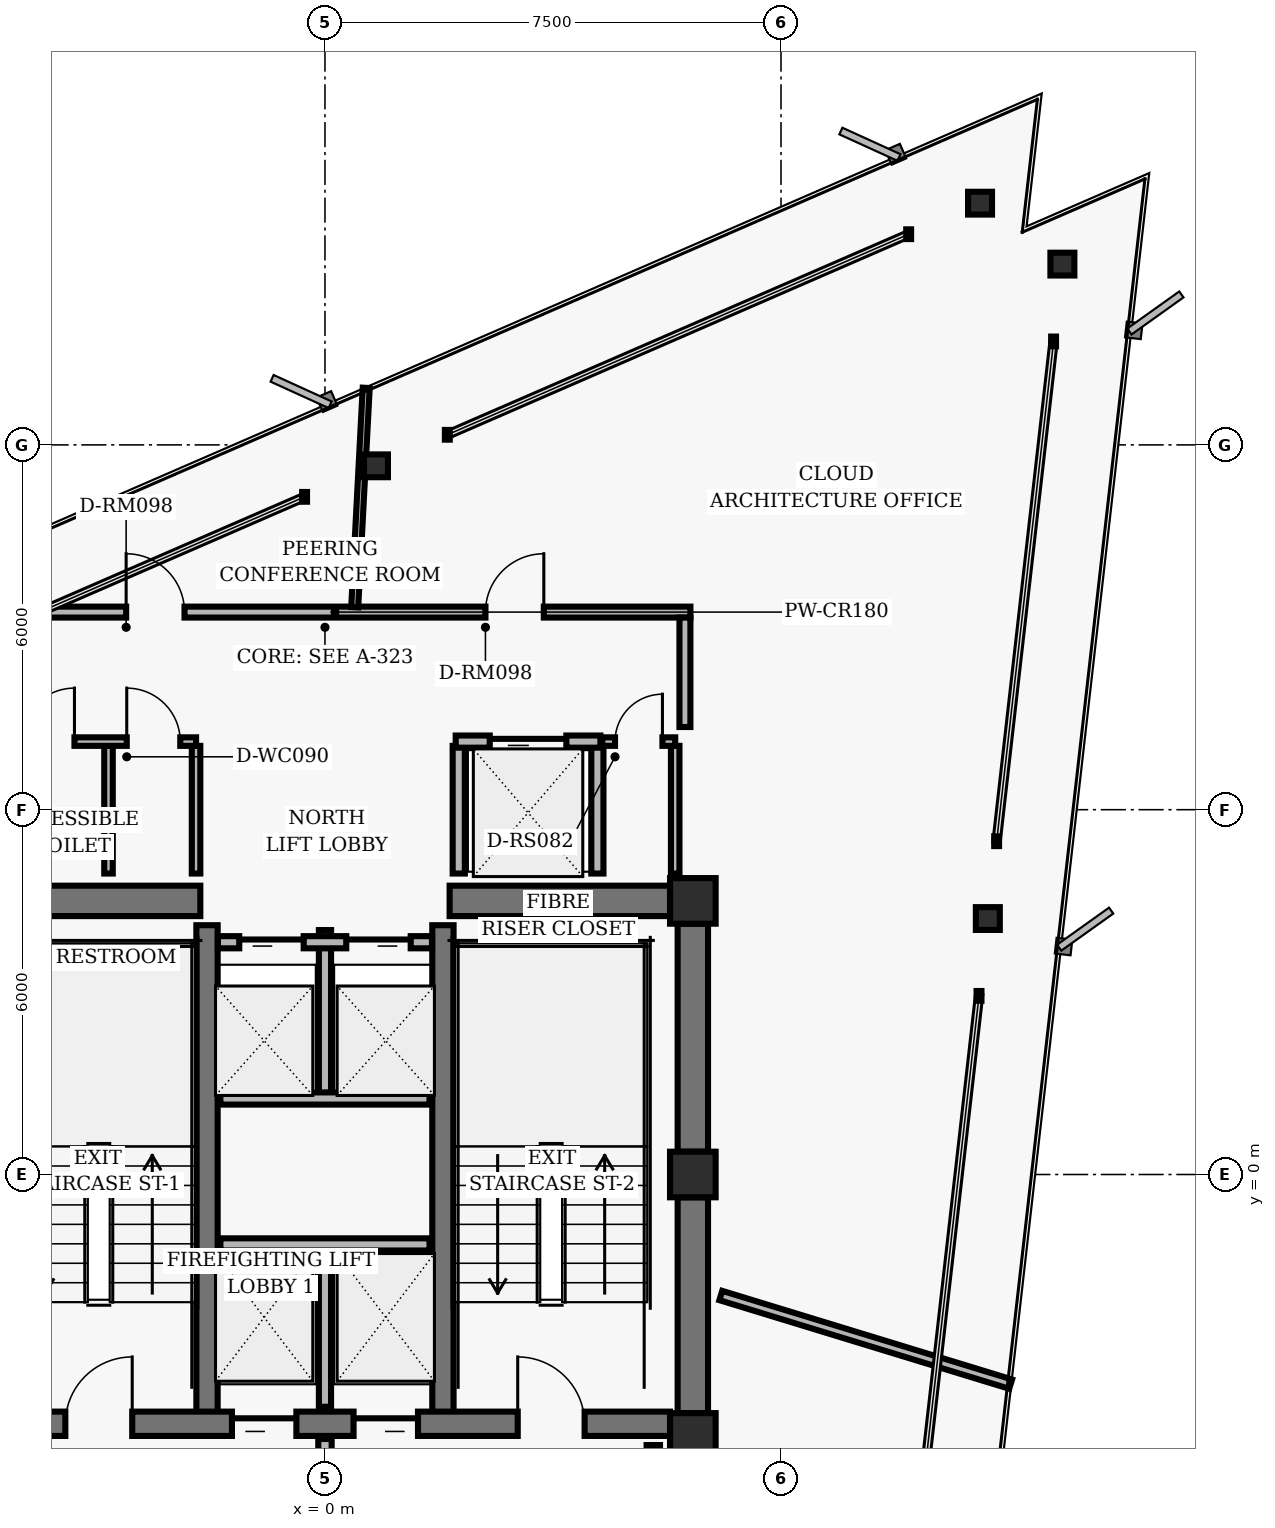
"""IFC4 building model, lengths in metres.
Left out: names, types, materials, properties, quantities, classifications, styles, units other than length and angle.
Written with IfcOpenShell. Run it as: python <this file> out.ifc"""

import sys

from ifc_helpers import new_model, si_unit, direction, frame, frame_2d, origin, origin_2d, place, context, subcontext, project, spatial, rectangle, hollow_rectangle, i_section, extrude, element, fill, save


model = new_model("IFC4")
c1 = context("Model", 3, precision=1e-05, world=origin(), true_north=direction((0.0, 1.0)))
c2 = subcontext(c1, "Body", "Model", "MODEL_VIEW")
j1 = project(units=[si_unit("LENGTHUNIT", "METRE"), si_unit("PLANEANGLEUNIT", "RADIAN")], contexts=[c1])
p1 = place(None, origin())
s1 = spatial("IfcSite", under=j1, at=p1, CompositionType="ELEMENT")
p2 = place(p1, origin())
s2 = spatial("IfcBuilding", under=s1, at=p2, CompositionType="ELEMENT")
p3 = place(p2, frame((0.0, 0.0, 224.0)))
s3 = spatial("IfcBuildingStorey", under=s2, at=p3, CompositionType="ELEMENT", Elevation=224.0)
for number, where, z_axis, x_axis in (
    (1, (6.05, 4.5, 0.0), (0.0, 0.0, 1.0), (1.0, 0.0, 0.0)),
    (2, (6.05, 0.0, 0.0), (0.0, 0.0, 1.0), (1.0, 0.0, 0.0)),
    (3, (6.05, -4.3, 0.0), (0.0, 0.0, 1.0), (1.0, 0.0, 0.0)),
):
    element("IfcColumn", number, at=place(p3, frame(where, z_axis=z_axis, x_axis=x_axis)), inside=s3, PredefinedType="COLUMN", context=c2, shape_type="SweptSolid", body=[
        extrude(hollow_rectangle(XDim=0.75, YDim=0.75, WallThickness=0.05, InnerFilletRadius=0.02, OuterFilletRadius=0.04, at=origin_2d()), origin(), (0.0, 0.0, 1.0), 3.04),
    ])
p4 = place(p3, frame((6.05, 0.375, 0.0), z_axis=(0.0, 0.0, 1.0), x_axis=(0.0, 1.0, 0.0)))
e4 = element("IfcWall", 4, at=p4, inside=s3, PredefinedType="SHEAR", context=c2, shape_type="SweptSolid", body=[
    extrude(rectangle(XDim=3.75, YDim=0.5, at=frame_2d((1.875, 0.0))), origin(), (0.0, 0.0, 1.0), 2.798),
])
p5 = place(p3, frame((6.05, -3.925, 0.0), z_axis=(0.0, 0.0, 1.0), x_axis=(0.0, 1.0, 0.0)))
e5 = element("IfcWall", 5, at=p5, inside=s3, PredefinedType="SHEAR", context=c2, shape_type="SweptSolid", body=[
    extrude(rectangle(XDim=3.55, YDim=0.5, at=frame_2d((1.775, 0.0))), origin(), (0.0, 0.0, 1.0), 2.798),
])
for number, where, z_axis, x_axis in (
    (6, (-1.94, -4.1, 0.0), (0.0, 0.0, 1.0), (0.0, 1.0, 0.0)),
    (7, (1.94, -4.1, 0.0), (0.0, 0.0, 1.0), (0.0, 1.0, 0.0)),
):
    element("IfcWall", number, at=place(p3, frame(where, z_axis=z_axis, x_axis=x_axis)), inside=s3, PredefinedType="SHEAR", context=c2, shape_type="SweptSolid", body=[
        extrude(rectangle(XDim=8.2, YDim=0.35, at=frame_2d((4.1, 0.0))), origin(), (0.0, 0.0, 1.0), 2.798),
    ])
p6 = place(p3, frame((-5.675, -4.1, 0.0), z_axis=(0.0, 0.0, 1.0), x_axis=(1.0, 0.0, 0.0)))
e8 = element("IfcWall", 8, at=p6, inside=s3, PredefinedType="SHEAR", context=c2, shape_type="SweptSolid", body=[
    extrude(rectangle(XDim=11.35, YDim=0.4, at=frame_2d((5.675, 0.0))), origin(), (0.0, 0.0, 1.0), 2.798),
])
p7 = place(p6, frame((1.405, 0.0, 0.0)))
e9 = element("IfcOpeningElement", 9, at=p7, cuts=e8, PredefinedType="OPENING", context=c2, shape_type="SweptSolid", body=[
    extrude(rectangle(XDim=1.1, YDim=2.04, at=frame_2d((0.55, 1.02))), frame((0.0, 0.21, 0.0), z_axis=(0.0, -1.0, 0.0), x_axis=(1.0, 0.0, 0.0)), (0.0, 0.0, 1.0), 0.42),
])
p8 = place(p6, frame((8.845, 0.0, 0.0)))
e10 = element("IfcOpeningElement", 10, at=p8, cuts=e8, PredefinedType="OPENING", context=c2, shape_type="SweptSolid", body=[
    extrude(rectangle(XDim=1.1, YDim=2.04, at=frame_2d((0.55, 1.02))), frame((0.0, 0.21, 0.0), z_axis=(0.0, -1.0, 0.0), x_axis=(1.0, 0.0, 0.0)), (0.0, 0.0, 1.0), 0.42),
])
p9 = place(p6, frame((4.145, 0.0, 0.0)))
e11 = element("IfcOpeningElement", 11, at=p9, cuts=e8, PredefinedType="OPENING", context=c2, shape_type="SweptSolid", body=[
    extrude(rectangle(XDim=1.06, YDim=2.04, at=frame_2d((0.53, 1.02))), frame((0.0, 0.21, 0.0), z_axis=(0.0, -1.0, 0.0), x_axis=(1.0, 0.0, 0.0)), (0.0, 0.0, 1.0), 0.42),
])
p10 = place(p6, frame((6.145, 0.0, 0.0)))
e12 = element("IfcOpeningElement", 12, at=p10, cuts=e8, PredefinedType="OPENING", context=c2, shape_type="SweptSolid", body=[
    extrude(rectangle(XDim=1.06, YDim=2.04, at=frame_2d((0.53, 1.02))), frame((0.0, 0.21, 0.0), z_axis=(0.0, -1.0, 0.0), x_axis=(1.0, 0.0, 0.0)), (0.0, 0.0, 1.0), 0.42),
])
for number, where, z_axis, x_axis in (
    (13, (-5.675, 4.5, 0.0), (0.0, 0.0, 1.0), (1.0, 0.0, 0.0)),
    (14, (2.05, 4.5, 0.0), (0.0, 0.0, 1.0), (1.0, 0.0, 0.0)),
):
    element("IfcWall", number, at=place(p3, frame(where, z_axis=z_axis, x_axis=x_axis)), inside=s3, PredefinedType="SHEAR", context=c2, shape_type="SweptSolid", body=[
        extrude(rectangle(XDim=3.625, YDim=0.5, at=frame_2d((1.812, 0.0))), origin(), (0.0, 0.0, 1.0), 2.798),
    ])
for number, where, z_axis, x_axis in (
    (15, (10.901, 4.21, 0.0), (0.0, 0.0, 1.0), (1.0, 0.0, 0.0)),
    (16, (12.128, 14.973, 0.0), (0.0, 0.0, 1.0), (1.0, 0.0, 0.0)),
    (17, (10.773, 15.976, 0.0), (0.0, 0.0, 1.0), (1.0, 0.0, 0.0)),
    (18, (0.838, 11.656, 0.0), (0.0, 0.0, 1.0), (1.0, 0.0, 0.0)),
):
    element("IfcColumn", number, at=place(p3, frame(where, z_axis=z_axis, x_axis=x_axis)), inside=s3, PredefinedType="COLUMN", context=c2, shape_type="SweptSolid", body=[
        extrude(i_section(OverallWidth=0.394, OverallDepth=0.375, WebThickness=0.017, FlangeThickness=0.028, FilletRadius=0.016, at=origin_2d()), origin(), (0.0, 0.0, 1.0), 3.04),
    ])
p11 = place(p3, frame((0.0, -3.82, 0.0), z_axis=(0.0, 0.0, 1.0), x_axis=(0.0, 1.0, 0.0)))
e19 = element("IfcWall", 19, at=p11, inside=s3, PredefinedType="PARTITIONING", context=c2, shape_type="SweptSolid", body=[
    extrude(rectangle(XDim=2.67, YDim=0.2, at=frame_2d((1.335, 0.0))), origin(), (0.0, 0.0, 1.0), 2.773),
])
p12 = place(p3, frame((-1.72, -1.15, 0.0), z_axis=(0.0, 0.0, 1.0), x_axis=(1.0, 0.0, 0.0)))
e20 = element("IfcWall", 20, at=p12, inside=s3, PredefinedType="PARTITIONING", context=c2, shape_type="SweptSolid", body=[
    extrude(rectangle(XDim=3.44, YDim=0.2, at=frame_2d((1.72, 0.0))), origin(), (0.0, 0.0, 1.0), 2.773),
])
p13 = place(p3, frame((5.4, -7.16, 0.0), z_axis=(0.0, 0.0, 1.0), x_axis=(0.0, 1.0, 0.0)))
e21 = element("IfcWall", 21, at=p13, inside=s3, PredefinedType="PARTITIONING", context=c2, shape_type="SweptSolid", body=[
    extrude(rectangle(XDim=2.71, YDim=0.22, at=frame_2d((1.355, 0.0))), origin(), (0.0, 0.0, 1.0), 2.773),
])
p14 = place(p3, frame((0.0, -7.16, 0.0), z_axis=(0.0, 0.0, 1.0), x_axis=(0.0, 1.0, 0.0)))
e22 = element("IfcWall", 22, at=p14, inside=s3, PredefinedType="PARTITIONING", context=c2, shape_type="SweptSolid", body=[
    extrude(rectangle(XDim=2.81, YDim=0.22, at=frame_2d((1.405, 0.0))), origin(), (0.0, 0.0, 1.0), 2.773),
])
p15 = place(p3, frame((0.0, 1.25, 0.0), z_axis=(0.0, 0.0, 1.0), x_axis=(0.0, 1.0, 0.0)))
e23 = element("IfcWall", 23, at=p15, inside=s3, PredefinedType="PARTITIONING", context=c2, shape_type="SweptSolid", body=[
    extrude(rectangle(XDim=2.77, YDim=0.2, at=frame_2d((1.385, 0.0))), origin(), (0.0, 0.0, 1.0), 2.773),
])
p16 = place(p3, frame((-1.72, 1.25, 0.0), z_axis=(0.0, 0.0, 1.0), x_axis=(1.0, 0.0, 0.0)))
e24 = element("IfcWall", 24, at=p16, inside=s3, PredefinedType="PARTITIONING", context=c2, shape_type="SweptSolid", body=[
    extrude(rectangle(XDim=3.44, YDim=0.2, at=frame_2d((1.72, 0.0))), origin(), (0.0, 0.0, 1.0), 2.773),
])
p17 = place(p3, frame((-1.76, 3.82, 0.0), z_axis=(0.0, 0.0, 1.0), x_axis=(1.0, 0.0, 0.0)))
e25 = element("IfcWall", 25, at=p17, inside=s3, PredefinedType="PARTITIONING", context=c2, shape_type="SweptSolid", body=[
    extrude(rectangle(XDim=3.52, YDim=0.2, at=frame_2d((1.76, 0.0))), origin(), (0.0, 0.0, 1.0), 2.773),
])
p18 = place(p17, frame((0.35, 0.0, 0.0)))
e26 = element("IfcOpeningElement", 26, at=p18, cuts=e25, PredefinedType="OPENING", context=c2, shape_type="SweptSolid", body=[
    extrude(rectangle(XDim=1.06, YDim=2.04, at=frame_2d((0.53, 1.02))), frame((0.0, 0.11, 0.0), z_axis=(0.0, -1.0, 0.0), x_axis=(1.0, 0.0, 0.0)), (0.0, 0.0, 1.0), 0.22),
])
p19 = place(p17, frame((2.11, 0.0, 0.0)))
e27 = element("IfcOpeningElement", 27, at=p19, cuts=e25, PredefinedType="OPENING", context=c2, shape_type="SweptSolid", body=[
    extrude(rectangle(XDim=1.06, YDim=2.04, at=frame_2d((0.53, 1.02))), frame((0.0, 0.11, 0.0), z_axis=(0.0, -1.0, 0.0), x_axis=(1.0, 0.0, 0.0)), (0.0, 0.0, 1.0), 0.22),
])
for number, where, z_axis, x_axis in (
    (28, (2.2, 4.95, 0.0), (0.0, 0.0, 1.0), (0.0, 1.0, 0.0)),
    (29, (4.48, 4.95, 0.0), (0.0, 0.0, 1.0), (0.0, 1.0, 0.0)),
):
    element("IfcWall", number, at=place(p3, frame(where, z_axis=z_axis, x_axis=x_axis)), inside=s3, PredefinedType="PARTITIONING", context=c2, shape_type="SweptSolid", body=[
        extrude(rectangle(XDim=2.1, YDim=0.2, at=frame_2d((1.05, 0.0))), origin(), (0.0, 0.0, 1.0), 2.773),
    ])
p20 = place(p3, frame((2.15, 7.12, 0.0), z_axis=(0.0, 0.0, 1.0), x_axis=(1.0, 0.0, 0.0)))
e30 = element("IfcWall", 30, at=p20, inside=s3, PredefinedType="PARTITIONING", context=c2, shape_type="SweptSolid", body=[
    extrude(rectangle(XDim=2.38, YDim=0.2, at=frame_2d((1.19, 0.0))), origin(), (0.0, 0.0, 1.0), 2.395),
])
p21 = place(p20, frame((0.56, 0.0, 0.0)))
e31 = element("IfcOpeningElement", 31, at=p21, cuts=e30, PredefinedType="OPENING", context=c2, shape_type="SweptSolid", body=[
    extrude(rectangle(XDim=1.26, YDim=2.06, at=frame_2d((0.63, 1.03))), frame((0.0, 0.11, 0.0), z_axis=(0.0, -1.0, 0.0), x_axis=(1.0, 0.0, 0.0)), (0.0, 0.0, 1.0), 0.22),
])
for number, where, z_axis, x_axis in (
    (32, (-3.56, 4.95, 0.0), (0.0, 0.0, 1.0), (0.0, 1.0, 0.0)),
    (33, (-2.12, 4.95, 0.0), (0.0, 0.0, 1.0), (0.0, 1.0, 0.0)),
):
    element("IfcWall", number, at=place(p3, frame(where, z_axis=z_axis, x_axis=x_axis)), inside=s3, PredefinedType="PARTITIONING", context=c2, shape_type="SweptSolid", body=[
        extrude(rectangle(XDim=2.1, YDim=0.14, at=frame_2d((1.05, 0.0))), origin(), (0.0, 0.0, 1.0), 2.773),
    ])
p22 = place(p3, frame((-5.48, 7.12, 0.0), z_axis=(0.0, 0.0, 1.0), x_axis=(1.0, 0.0, 0.0)))
e34 = element("IfcWall", 34, at=p22, inside=s3, PredefinedType="PARTITIONING", context=c2, shape_type="SweptSolid", body=[
    extrude(rectangle(XDim=3.36, YDim=0.14, at=frame_2d((1.68, 0.0))), origin(), (0.0, 0.0, 1.0), 2.395),
])
p23 = place(p22, frame((0.48, 0.0, 0.0)))
e35 = element("IfcOpeningElement", 35, at=p23, cuts=e34, PredefinedType="OPENING", context=c2, shape_type="SweptSolid", body=[
    extrude(rectangle(XDim=0.88, YDim=2.02, at=frame_2d((0.44, 1.01))), frame((0.0, 0.08, 0.0), z_axis=(0.0, -1.0, 0.0), x_axis=(1.0, 0.0, 0.0)), (0.0, 0.0, 1.0), 0.16),
])
p24 = place(p22, frame((2.22, 0.0, 0.0)))
e36 = element("IfcOpeningElement", 36, at=p24, cuts=e34, PredefinedType="OPENING", context=c2, shape_type="SweptSolid", body=[
    extrude(rectangle(XDim=0.88, YDim=2.02, at=frame_2d((0.44, 1.01))), frame((0.0, 0.08, 0.0), z_axis=(0.0, -1.0, 0.0), x_axis=(1.0, 0.0, 0.0)), (0.0, 0.0, 1.0), 0.16),
])
p25 = place(p3, frame((5.76, 4.95, 0.0), z_axis=(0.0, 0.0, 1.0), x_axis=(0.0, 1.0, 0.0)))
e37 = element("IfcWall", 37, at=p25, inside=s3, PredefinedType="PARTITIONING", context=c2, shape_type="SweptSolid", body=[
    extrude(rectangle(XDim=2.1, YDim=0.14, at=frame_2d((1.05, 0.0))), origin(), (0.0, 0.0, 1.0), 2.773),
])
p26 = place(p3, frame((4.56, 7.12, 0.0), z_axis=(0.0, 0.0, 1.0), x_axis=(1.0, 0.0, 0.0)))
e38 = element("IfcWall", 38, at=p26, inside=s3, PredefinedType="PARTITIONING", context=c2, shape_type="SweptSolid", body=[
    extrude(rectangle(XDim=1.2, YDim=0.14, at=frame_2d((0.6, 0.0))), origin(), (0.0, 0.0, 1.0), 2.773),
])
p27 = place(p26, frame((0.21, 0.0, 0.0)))
e39 = element("IfcOpeningElement", 39, at=p27, cuts=e38, PredefinedType="OPENING", context=c2, shape_type="SweptSolid", body=[
    extrude(rectangle(XDim=0.78, YDim=2.01, at=frame_2d((0.39, 1.005))), frame((0.0, 0.08, 0.0), z_axis=(0.0, -1.0, 0.0), x_axis=(1.0, 0.0, 0.0)), (0.0, 0.0, 1.0), 0.16),
])
p28 = place(p3, frame((-7.29, 9.25, 0.0), z_axis=(0.0, 0.0, 1.0), x_axis=(1.0, 0.0, 0.0)))
e40 = element("IfcWall", 40, at=p28, inside=s3, PredefinedType="PARTITIONING", context=c2, shape_type="SweptSolid", body=[
    extrude(rectangle(XDim=13.3, YDim=0.18, at=frame_2d((6.65, 0.0))), origin(), (0.0, 0.0, 1.0), 2.395),
])
p29 = place(p28, frame((9.929, 0.0, 0.0)))
e41 = element("IfcOpeningElement", 41, at=p29, cuts=e40, PredefinedType="OPENING", context=c2, shape_type="SweptSolid", body=[
    extrude(rectangle(XDim=0.96, YDim=2.02, at=frame_2d((0.48, 1.01))), frame((0.0, 0.1, 0.0), z_axis=(0.0, -1.0, 0.0), x_axis=(1.0, 0.0, 0.0)), (0.0, 0.0, 1.0), 0.2),
])
p30 = place(p28, frame((4.02, 0.0, 0.0)))
e42 = element("IfcOpeningElement", 42, at=p30, cuts=e40, PredefinedType="OPENING", context=c2, shape_type="SweptSolid", body=[
    extrude(rectangle(XDim=0.96, YDim=2.02, at=frame_2d((0.48, 1.01))), frame((0.0, 0.1, 0.0), z_axis=(0.0, -1.0, 0.0), x_axis=(1.0, 0.0, 0.0)), (0.0, 0.0, 1.0), 0.2),
])
p31 = place(p3, frame((5.92, 9.16, 0.0), z_axis=(0.0, 0.0, 1.0), x_axis=(0.0, -1.0, 0.0)))
e43 = element("IfcWall", 43, at=p31, inside=s3, PredefinedType="PARTITIONING", context=c2, shape_type="SweptSolid", body=[
    extrude(rectangle(XDim=1.8, YDim=0.18, at=frame_2d((0.9, 0.0))), origin(), (0.0, 0.0, 1.0), 2.773),
])
p32 = place(p3, frame((6.51, -1.99, 0.0), z_axis=(0.0, 0.0, 1.0), x_axis=(0.956296423481, -0.292398957653, 0.0)))
e44 = element("IfcWall", 44, at=p32, inside=s3, PredefinedType="PARTITIONING", context=c2, shape_type="SweptSolid", body=[
    extrude(rectangle(XDim=4.985, YDim=0.16, at=frame_2d((2.492, 0.0))), origin(), (0.0, 0.0, 1.0), 2.773),
])
p33 = place(p3, frame((0.489, 9.33, 0.0), z_axis=(0.0, 0.0, 1.0), x_axis=(0.05229993373, 0.998631421963, 0.0)))
e45 = element("IfcWall", 45, at=p33, inside=s3, PredefinedType="MOVABLE", context=c2, shape_type="SweptSolid", body=[
    extrude(rectangle(XDim=3.613, YDim=0.115, at=frame_2d((1.807, 0.0))), origin(), (0.0, 0.0, 1.0), 2.773),
])
p34 = place(p7, origin())
e46 = element("IfcDoor", 46, at=p34, inside=s3, OperationType="SINGLE_SWING_RIGHT", PredefinedType="DOOR", context=c2, shape_type="SweptSolid", body=[
    extrude(rectangle(XDim=1.1, YDim=2.04, at=frame_2d((0.55, 1.02))), frame((0.0, 0.025, 0.0), z_axis=(0.0, -1.0, 0.0), x_axis=(1.0, 0.0, 0.0)), (0.0, 0.0, 1.0), 0.05),
])
fill(e9, e46)
p35 = place(p8, origin())
e47 = element("IfcDoor", 47, at=p35, inside=s3, OperationType="SINGLE_SWING_LEFT", PredefinedType="DOOR", context=c2, shape_type="SweptSolid", body=[
    extrude(rectangle(XDim=1.1, YDim=2.04, at=frame_2d((0.55, 1.02))), frame((0.0, 0.025, 0.0), z_axis=(0.0, -1.0, 0.0), x_axis=(1.0, 0.0, 0.0)), (0.0, 0.0, 1.0), 0.05),
])
fill(e10, e47)
p36 = place(p9, origin())
e48 = element("IfcDoor", 48, at=p36, inside=s3, OperationType="SLIDING_TO_LEFT", PredefinedType="DOOR", context=c2, shape_type="SweptSolid", body=[
    extrude(rectangle(XDim=1.06, YDim=2.04, at=frame_2d((0.53, 1.02))), frame((0.0, 0.025, 0.0), z_axis=(0.0, -1.0, 0.0), x_axis=(1.0, 0.0, 0.0)), (0.0, 0.0, 1.0), 0.05),
])
fill(e11, e48)
p37 = place(p10, origin())
e49 = element("IfcDoor", 49, at=p37, inside=s3, OperationType="SLIDING_TO_RIGHT", PredefinedType="DOOR", context=c2, shape_type="SweptSolid", body=[
    extrude(rectangle(XDim=1.06, YDim=2.04, at=frame_2d((0.53, 1.02))), frame((0.0, 0.025, 0.0), z_axis=(0.0, -1.0, 0.0), x_axis=(1.0, 0.0, 0.0)), (0.0, 0.0, 1.0), 0.05),
])
fill(e12, e49)
p38 = place(p18, origin())
e50 = element("IfcDoor", 50, at=p38, inside=s3, OperationType="SLIDING_TO_LEFT", PredefinedType="DOOR", context=c2, shape_type="SweptSolid", body=[
    extrude(rectangle(XDim=1.06, YDim=2.04, at=frame_2d((0.53, 1.02))), frame((0.0, 0.025, 0.0), z_axis=(0.0, -1.0, 0.0), x_axis=(1.0, 0.0, 0.0)), (0.0, 0.0, 1.0), 0.05),
])
fill(e26, e50)
p39 = place(p19, origin())
e51 = element("IfcDoor", 51, at=p39, inside=s3, OperationType="SLIDING_TO_RIGHT", PredefinedType="DOOR", context=c2, shape_type="SweptSolid", body=[
    extrude(rectangle(XDim=1.06, YDim=2.04, at=frame_2d((0.53, 1.02))), frame((0.0, 0.025, 0.0), z_axis=(0.0, -1.0, 0.0), x_axis=(1.0, 0.0, 0.0)), (0.0, 0.0, 1.0), 0.05),
])
fill(e27, e51)
p40 = place(p21, origin())
e52 = element("IfcDoor", 52, at=p40, inside=s3, OperationType="SLIDING_TO_LEFT", PredefinedType="DOOR", context=c2, shape_type="SweptSolid", body=[
    extrude(rectangle(XDim=1.26, YDim=2.06, at=frame_2d((0.63, 1.03))), frame((0.0, 0.025, 0.0), z_axis=(0.0, -1.0, 0.0), x_axis=(1.0, 0.0, 0.0)), (0.0, 0.0, 1.0), 0.05),
])
fill(e31, e52)
p41 = place(p23, origin())
e53 = element("IfcDoor", 53, at=p41, inside=s3, OperationType="SINGLE_SWING_RIGHT", PredefinedType="DOOR", context=c2, shape_type="SweptSolid", body=[
    extrude(rectangle(XDim=0.88, YDim=2.02, at=frame_2d((0.44, 1.01))), frame((0.0, 0.025, 0.0), z_axis=(0.0, -1.0, 0.0), x_axis=(1.0, 0.0, 0.0)), (0.0, 0.0, 1.0), 0.05),
])
fill(e35, e53)
p42 = place(p24, origin())
e54 = element("IfcDoor", 54, at=p42, inside=s3, OperationType="SINGLE_SWING_LEFT", PredefinedType="DOOR", context=c2, shape_type="SweptSolid", body=[
    extrude(rectangle(XDim=0.88, YDim=2.02, at=frame_2d((0.44, 1.01))), frame((0.0, 0.025, 0.0), z_axis=(0.0, -1.0, 0.0), x_axis=(1.0, 0.0, 0.0)), (0.0, 0.0, 1.0), 0.05),
])
fill(e36, e54)
p43 = place(p27, origin())
e55 = element("IfcDoor", 55, at=p43, inside=s3, OperationType="SINGLE_SWING_RIGHT", PredefinedType="DOOR", context=c2, shape_type="SweptSolid", body=[
    extrude(rectangle(XDim=0.78, YDim=2.01, at=frame_2d((0.39, 1.005))), frame((0.0, 0.025, 0.0), z_axis=(0.0, -1.0, 0.0), x_axis=(1.0, 0.0, 0.0)), (0.0, 0.0, 1.0), 0.05),
])
fill(e39, e55)
p44 = place(p29, origin())
e56 = element("IfcDoor", 56, at=p44, inside=s3, OperationType="SINGLE_SWING_RIGHT", PredefinedType="DOOR", context=c2, shape_type="SweptSolid", body=[
    extrude(rectangle(XDim=0.96, YDim=2.02, at=frame_2d((0.48, 1.01))), frame((0.0, 0.025, 0.0), z_axis=(0.0, -1.0, 0.0), x_axis=(1.0, 0.0, 0.0)), (0.0, 0.0, 1.0), 0.05),
])
fill(e41, e56)
p45 = place(p30, origin())
e57 = element("IfcDoor", 57, at=p45, inside=s3, OperationType="SINGLE_SWING_LEFT", PredefinedType="DOOR", context=c2, shape_type="SweptSolid", body=[
    extrude(rectangle(XDim=0.96, YDim=2.02, at=frame_2d((0.48, 1.01))), frame((0.0, 0.025, 0.0), z_axis=(0.0, -1.0, 0.0), x_axis=(1.0, 0.0, 0.0)), (0.0, 0.0, 1.0), 0.05),
])
fill(e42, e57)
save(model, sys.argv[1])
